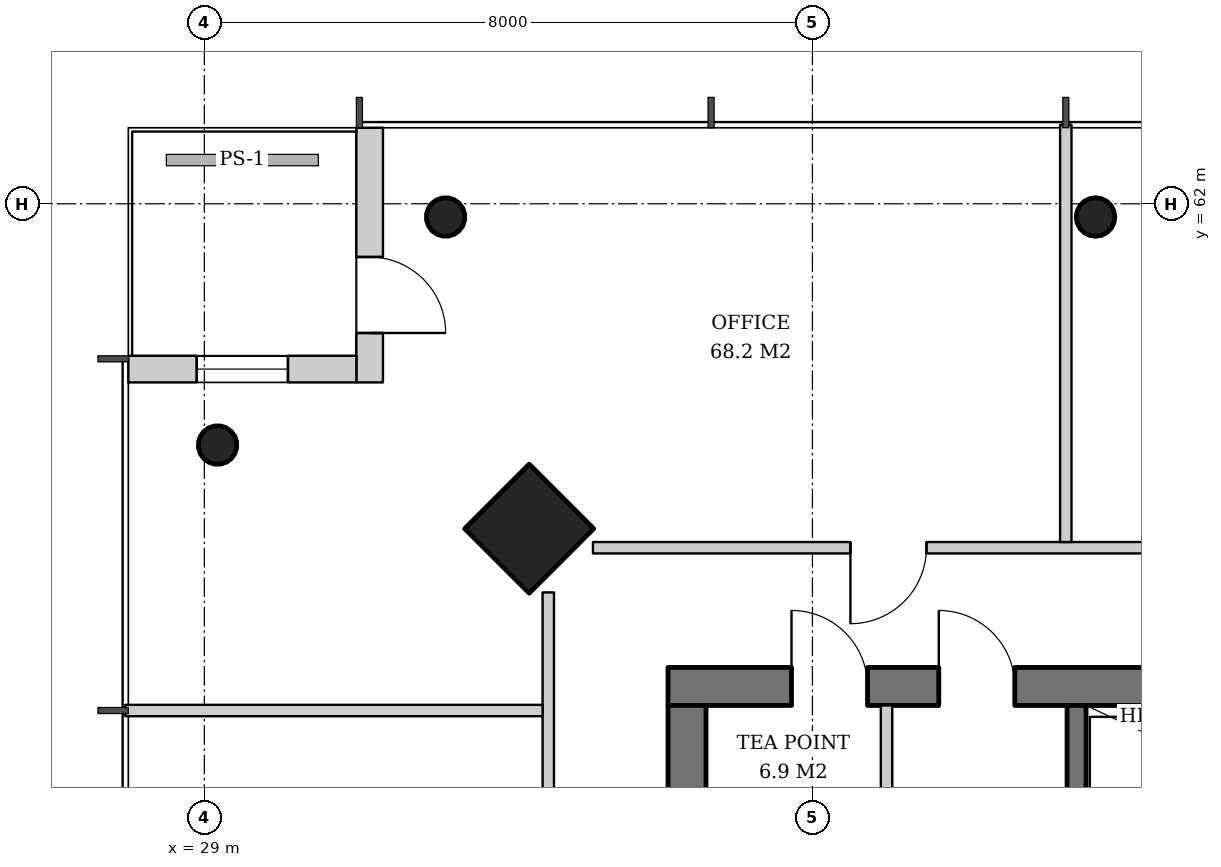
"""IFC4 building model, lengths in metres.
Left out: names, types, materials, properties, quantities, classifications, styles, units other than length and angle.
Written with IfcOpenShell. Run it as: python <this file> out.ifc"""

import sys

from ifc_helpers import new_model, si_unit, direction, frame, frame_2d, origin, origin_2d, place, context, subcontext, project, spatial, rectangle, hollow_circle, extrude, element, fill, save


model = new_model("IFC4")
c1 = context("Model", 3, precision=1e-05, world=origin(), true_north=direction((0.0, 1.0)))
c2 = subcontext(c1, "Body", "Model", "MODEL_VIEW")
j1 = project(units=[si_unit("LENGTHUNIT", "METRE"), si_unit("PLANEANGLEUNIT", "RADIAN")], contexts=[c1])
p1 = place(None, origin())
s1 = spatial("IfcSite", under=j1, at=p1, CompositionType="ELEMENT")
p2 = place(p1, origin())
s2 = spatial("IfcBuilding", under=s1, at=p2, CompositionType="ELEMENT")
p3 = place(p2, frame((0.0, 0.0, 275.6)))
s3 = spatial("IfcBuildingStorey", under=s2, at=p3, CompositionType="ELEMENT", Elevation=275.6)
p4 = place(p3, frame((33.236, 57.764, 0.0), z_axis=(0.031964207655, -0.031964207655, 0.998977766949), x_axis=(0.707106781187, 0.707106781187, 0.0)))
e1 = element("IfcColumn", 1, at=p4, inside=s3, PredefinedType="COLUMN", context=c2, shape_type="SweptSolid", body=[
    extrude(rectangle(XDim=1.2, YDim=1.2, at=origin_2d()), origin(), (0.0, 0.0, 1.0), 3.804),
])
p5 = place(p3, frame((32.136, 61.864, 0.0), z_axis=(0.031900153262, -0.031900153262, 0.998981861919), x_axis=(0.707106781187, 0.707106781187, 0.0)))
e2 = element("IfcColumn", 2, at=p5, inside=s3, PredefinedType="COLUMN", context=c2, shape_type="SweptSolid", body=[
    extrude(hollow_circle(Radius=0.254, WallThickness=0.02, at=origin_2d()), origin(), (0.0, 0.0, 1.0), 3.804),
])
p6 = place(p3, frame((40.712, 61.864, 0.0), z_axis=(0.010659599298, -0.031914583439, 0.999433755837), x_axis=(0.948492281772, 0.316800238982, 0.0)))
e3 = element("IfcColumn", 3, at=p6, inside=s3, PredefinedType="COLUMN", context=c2, shape_type="SweptSolid", body=[
    extrude(hollow_circle(Radius=0.254, WallThickness=0.02, at=origin_2d()), origin(), (0.0, 0.0, 1.0), 3.802),
])
p7 = place(p3, frame((29.136, 58.864, 0.0), z_axis=(0.031900153262, -0.031900153262, 0.998981861919), x_axis=(0.707106781187, 0.707106781187, 0.0)))
e4 = element("IfcColumn", 4, at=p7, inside=s3, PredefinedType="COLUMN", context=c2, shape_type="SweptSolid", body=[
    extrude(hollow_circle(Radius=0.254, WallThickness=0.02, at=origin_2d()), origin(), (0.0, 0.0, 1.0), 3.804),
])
p8 = place(p3, frame((35.1, 55.65, 0.0), z_axis=(0.0, 0.0, 1.0), x_axis=(1.0, 0.0, 0.0)))
e5 = element("IfcWall", 5, at=p8, inside=s3, PredefinedType="SHEAR", context=c2, shape_type="SweptSolid", body=[
    extrude(rectangle(XDim=19.8, YDim=0.5, at=frame_2d((9.9, 0.0))), origin(), (0.0, 0.0, 1.0), 3.8),
])
p9 = place(p8, frame((14.54, 0.0, 0.0)))
e6 = element("IfcOpeningElement", 6, at=p9, cuts=e5, PredefinedType="OPENING", context=c2, shape_type="SweptSolid", body=[
    extrude(rectangle(XDim=1.0, YDim=2.1, at=frame_2d((0.5, 1.05))), frame((0.0, 0.26, 0.0), z_axis=(0.0, -1.0, 0.0), x_axis=(1.0, 0.0, 0.0)), (0.0, 0.0, 1.0), 0.52),
])
p10 = place(p8, frame((1.625, 0.0, 0.0)))
e7 = element("IfcOpeningElement", 7, at=p10, cuts=e5, PredefinedType="OPENING", context=c2, shape_type="SweptSolid", body=[
    extrude(rectangle(XDim=1.0, YDim=2.1, at=frame_2d((0.5, 1.05))), frame((0.0, 0.26, 0.0), z_axis=(0.0, -1.0, 0.0), x_axis=(1.0, 0.0, 0.0)), (0.0, 0.0, 1.0), 0.52),
])
p11 = place(p8, frame((3.562, 0.0, 0.0)))
e8 = element("IfcOpeningElement", 8, at=p11, cuts=e5, PredefinedType="OPENING", context=c2, shape_type="SweptSolid", body=[
    extrude(rectangle(XDim=1.0, YDim=2.1, at=frame_2d((0.5, 1.05))), frame((0.0, 0.26, 0.0), z_axis=(0.0, -1.0, 0.0), x_axis=(1.0, 0.0, 0.0)), (0.0, 0.0, 1.0), 0.52),
])
p12 = place(p3, frame((35.35, 36.6, 0.0), z_axis=(0.0, 0.0, 1.0), x_axis=(0.0, 1.0, 0.0)))
e9 = element("IfcWall", 9, at=p12, inside=s3, PredefinedType="SHEAR", context=c2, shape_type="SweptSolid", body=[
    extrude(rectangle(XDim=18.8, YDim=0.5, at=frame_2d((9.4, 0.0))), origin(), (0.0, 0.0, 1.0), 3.8),
])
p13 = place(p12, frame((8.5, 0.0, 0.0)))
e10 = element("IfcOpeningElement", 10, at=p13, cuts=e9, PredefinedType="OPENING", context=c2, shape_type="SweptSolid", body=[
    extrude(rectangle(XDim=1.8, YDim=2.4, at=frame_2d((0.9, 1.2))), frame((0.0, 0.26, 0.0), z_axis=(0.0, -1.0, 0.0), x_axis=(1.0, 0.0, 0.0)), (0.0, 0.0, 1.0), 0.52),
])
p14 = place(p3, frame((31.175, 63.0, 0.0), z_axis=(0.0, 0.0, 1.0), x_axis=(0.0, -1.0, 0.0)))
e11 = element("IfcWall", 11, at=p14, inside=s3, PredefinedType="SOLIDWALL", context=c2, shape_type="SweptSolid", body=[
    extrude(rectangle(XDim=3.35, YDim=0.35, at=frame_2d((1.675, 0.0))), origin(), (0.0, 0.0, 1.0), 3.62),
])
p15 = place(p14, frame((1.7, 0.0, 0.0)))
e12 = element("IfcOpeningElement", 12, at=p15, cuts=e11, PredefinedType="OPENING", context=c2, shape_type="SweptSolid", body=[
    extrude(rectangle(XDim=1.0, YDim=2.4, at=frame_2d((0.5, 1.2))), frame((0.0, 0.185, 0.0), z_axis=(0.0, -1.0, 0.0), x_axis=(1.0, 0.0, 0.0)), (0.0, 0.0, 1.0), 0.37),
])
p16 = place(p3, frame((31.0, 59.825, 0.0), z_axis=(0.0, 0.0, 1.0), x_axis=(-1.0, 0.0, 0.0)))
e13 = element("IfcWall", 13, at=p16, inside=s3, PredefinedType="SOLIDWALL", context=c2, shape_type="SweptSolid", body=[
    extrude(rectangle(XDim=3.0, YDim=0.35, at=frame_2d((1.5, 0.0))), origin(), (0.0, 0.0, 1.0), 3.62),
])
p17 = place(p16, frame((0.9, 0.0, 0.6)))
e14 = element("IfcOpeningElement", 14, at=p17, cuts=e13, PredefinedType="OPENING", context=c2, shape_type="SweptSolid", body=[
    extrude(rectangle(XDim=1.2, YDim=2.55, at=frame_2d((0.6, 1.275))), frame((0.0, 0.185, 0.0), z_axis=(0.0, -1.0, 0.0), x_axis=(1.0, 0.0, 0.0)), (0.0, 0.0, 1.0), 0.37),
])
p18 = place(p3, frame((40.475, 52.4, 0.0), z_axis=(0.0, 0.0, 1.0), x_axis=(0.0, 1.0, 0.0)))
e15 = element("IfcWall", 15, at=p18, inside=s3, PredefinedType="SHEAR", context=c2, shape_type="SweptSolid", body=[
    extrude(rectangle(XDim=3.0, YDim=0.25, at=frame_2d((1.5, 0.0))), origin(), (0.0, 0.0, 1.0), 3.8),
])
p19 = place(p3, frame((37.975, 52.4, 0.0), z_axis=(0.0, 0.0, 1.0), x_axis=(0.0, 1.0, 0.0)))
e16 = element("IfcWall", 16, at=p19, inside=s3, PredefinedType="SOLIDWALL", context=c2, shape_type="SweptSolid", body=[
    extrude(rectangle(XDim=3.0, YDim=0.15, at=frame_2d((1.5, 0.0))), origin(), (0.0, 0.0, 1.0), 3.62),
])
p20 = place(p3, frame((55.887, 57.475, 0.0), z_axis=(0.0, 0.0, 1.0), x_axis=(-1.0, 0.0, 0.0)))
e17 = element("IfcWall", 17, at=p20, inside=s3, PredefinedType="PARTITIONING", context=c2, shape_type="SweptSolid", body=[
    extrude(rectangle(XDim=21.774, YDim=0.15, at=frame_2d((10.887, 0.0))), origin(), (0.0, 0.0, 1.0), 2.867),
])
p21 = place(p20, frame((3.387, 0.0, 0.0)))
e18 = element("IfcOpeningElement", 18, at=p21, cuts=e17, PredefinedType="OPENING", context=c2, shape_type="SweptSolid", body=[
    extrude(rectangle(XDim=1.0, YDim=2.1, at=frame_2d((0.5, 1.05))), frame((0.0, 0.085, 0.0), z_axis=(0.0, -1.0, 0.0), x_axis=(1.0, 0.0, 0.0)), (0.0, 0.0, 1.0), 0.17),
])
p22 = place(p20, frame((7.654, 0.0, 0.0)))
e19 = element("IfcOpeningElement", 19, at=p22, cuts=e17, PredefinedType="OPENING", context=c2, shape_type="SweptSolid", body=[
    extrude(rectangle(XDim=1.8, YDim=2.4, at=frame_2d((0.9, 1.2))), frame((0.0, 0.085, 0.0), z_axis=(0.0, -1.0, 0.0), x_axis=(1.0, 0.0, 0.0)), (0.0, 0.0, 1.0), 0.17),
])
p23 = place(p20, frame((17.387, 0.0, 0.0)))
e20 = element("IfcOpeningElement", 20, at=p23, cuts=e17, PredefinedType="OPENING", context=c2, shape_type="SweptSolid", body=[
    extrude(rectangle(XDim=1.0, YDim=2.1, at=frame_2d((0.5, 1.05))), frame((0.0, 0.085, 0.0), z_axis=(0.0, -1.0, 0.0), x_axis=(1.0, 0.0, 0.0)), (0.0, 0.0, 1.0), 0.17),
])
p24 = place(p3, frame((40.333, 57.55, 0.0), z_axis=(0.0, 0.0, 1.0), x_axis=(0.0, 1.0, 0.0)))
e21 = element("IfcWall", 21, at=p24, inside=s3, PredefinedType="PARTITIONING", context=c2, shape_type="SweptSolid", body=[
    extrude(rectangle(XDim=5.49, YDim=0.15, at=frame_2d((2.745, 0.0))), origin(), (0.0, 0.0, 1.0), 3.12),
])
p25 = place(p3, frame((33.525, 56.887, 0.0), z_axis=(0.0, 0.0, 1.0), x_axis=(0.0, -1.0, 0.0)))
e22 = element("IfcWall", 22, at=p25, inside=s3, PredefinedType="PARTITIONING", context=c2, shape_type="SweptSolid", body=[
    extrude(rectangle(XDim=21.774, YDim=0.15, at=frame_2d((10.887, 0.0))), origin(), (0.0, 0.0, 1.0), 2.867),
])
p26 = place(p25, frame((3.387, 0.0, 0.0)))
e23 = element("IfcOpeningElement", 23, at=p26, cuts=e22, PredefinedType="OPENING", context=c2, shape_type="SweptSolid", body=[
    extrude(rectangle(XDim=1.0, YDim=2.1, at=frame_2d((0.5, 1.05))), frame((0.0, 0.085, 0.0), z_axis=(0.0, -1.0, 0.0), x_axis=(1.0, 0.0, 0.0)), (0.0, 0.0, 1.0), 0.17),
])
p27 = place(p25, frame((8.154, 0.0, 0.0)))
e24 = element("IfcOpeningElement", 24, at=p27, cuts=e22, PredefinedType="OPENING", context=c2, shape_type="SweptSolid", body=[
    extrude(rectangle(XDim=0.8, YDim=2.1, at=frame_2d((0.4, 1.05))), frame((0.0, 0.085, 0.0), z_axis=(0.0, -1.0, 0.0), x_axis=(1.0, 0.0, 0.0)), (0.0, 0.0, 1.0), 0.17),
])
p28 = place(p25, frame((12.72, 0.0, 0.0)))
e25 = element("IfcOpeningElement", 25, at=p28, cuts=e22, PredefinedType="OPENING", context=c2, shape_type="SweptSolid", body=[
    extrude(rectangle(XDim=1.0, YDim=2.1, at=frame_2d((0.5, 1.05))), frame((0.0, 0.085, 0.0), z_axis=(0.0, -1.0, 0.0), x_axis=(1.0, 0.0, 0.0)), (0.0, 0.0, 1.0), 0.17),
])
p29 = place(p25, frame((17.487, 0.0, 0.0)))
e26 = element("IfcOpeningElement", 26, at=p29, cuts=e22, PredefinedType="OPENING", context=c2, shape_type="SweptSolid", body=[
    extrude(rectangle(XDim=0.8, YDim=2.1, at=frame_2d((0.4, 1.05))), frame((0.0, 0.085, 0.0), z_axis=(0.0, -1.0, 0.0), x_axis=(1.0, 0.0, 0.0)), (0.0, 0.0, 1.0), 0.17),
])
p30 = place(p3, frame((33.45, 55.333, 0.0), z_axis=(0.0, 0.0, 1.0), x_axis=(-1.0, 0.0, 0.0)))
e27 = element("IfcWall", 27, at=p30, inside=s3, PredefinedType="PARTITIONING", context=c2, shape_type="SweptSolid", body=[
    extrude(rectangle(XDim=5.49, YDim=0.15, at=frame_2d((2.745, 0.0))), origin(), (0.0, 0.0, 1.0), 3.12),
])
p31 = place(p15, origin())
e28 = element("IfcDoor", 28, at=p31, inside=s3, OperationType="SINGLE_SWING_RIGHT", PredefinedType="DOOR", context=c2, shape_type="SweptSolid", body=[
    extrude(rectangle(XDim=1.0, YDim=2.4, at=frame_2d((0.5, 1.2))), frame((0.0, 0.025, 0.0), z_axis=(0.0, -1.0, 0.0), x_axis=(1.0, 0.0, 0.0)), (0.0, 0.0, 1.0), 0.05),
])
fill(e12, e28)
p32 = place(p17, origin())
e29 = element("IfcWindow", 29, at=p32, inside=s3, PartitioningType="SINGLE_PANEL", PredefinedType="WINDOW", context=c2, shape_type="SweptSolid", body=[
    extrude(rectangle(XDim=1.2, YDim=2.55, at=frame_2d((0.6, 1.275))), frame((0.0, 0.03, 0.0), z_axis=(0.0, -1.0, 0.0), x_axis=(1.0, 0.0, 0.0)), (0.0, 0.0, 1.0), 0.06),
])
fill(e14, e29)
p33 = place(p10, origin())
e30 = element("IfcDoor", 30, at=p33, inside=s3, OperationType="SINGLE_SWING_LEFT", PredefinedType="DOOR", context=c2, shape_type="SweptSolid", body=[
    extrude(rectangle(XDim=1.0, YDim=2.1, at=frame_2d((0.5, 1.05))), frame((0.0, -0.19, 0.0), z_axis=(0.0, -1.0, 0.0), x_axis=(1.0, 0.0, 0.0)), (0.0, 0.0, 1.0), 0.05),
])
fill(e7, e30)
p34 = place(p11, origin())
e31 = element("IfcDoor", 31, at=p34, inside=s3, OperationType="SINGLE_SWING_LEFT", PredefinedType="DOOR", context=c2, shape_type="SweptSolid", body=[
    extrude(rectangle(XDim=1.0, YDim=2.1, at=frame_2d((0.5, 1.05))), frame((0.0, -0.19, 0.0), z_axis=(0.0, -1.0, 0.0), x_axis=(1.0, 0.0, 0.0)), (0.0, 0.0, 1.0), 0.05),
])
fill(e8, e31)
p35 = place(p23, origin())
e32 = element("IfcDoor", 32, at=p35, inside=s3, OperationType="SINGLE_SWING_RIGHT", PredefinedType="DOOR", context=c2, shape_type="SweptSolid", body=[
    extrude(rectangle(XDim=1.0, YDim=2.1, at=frame_2d((0.5, 1.05))), frame((0.0, 0.025, 0.0), z_axis=(0.0, -1.0, 0.0), x_axis=(1.0, 0.0, 0.0)), (0.0, 0.0, 1.0), 0.05),
])
fill(e20, e32)
save(model, sys.argv[1])
